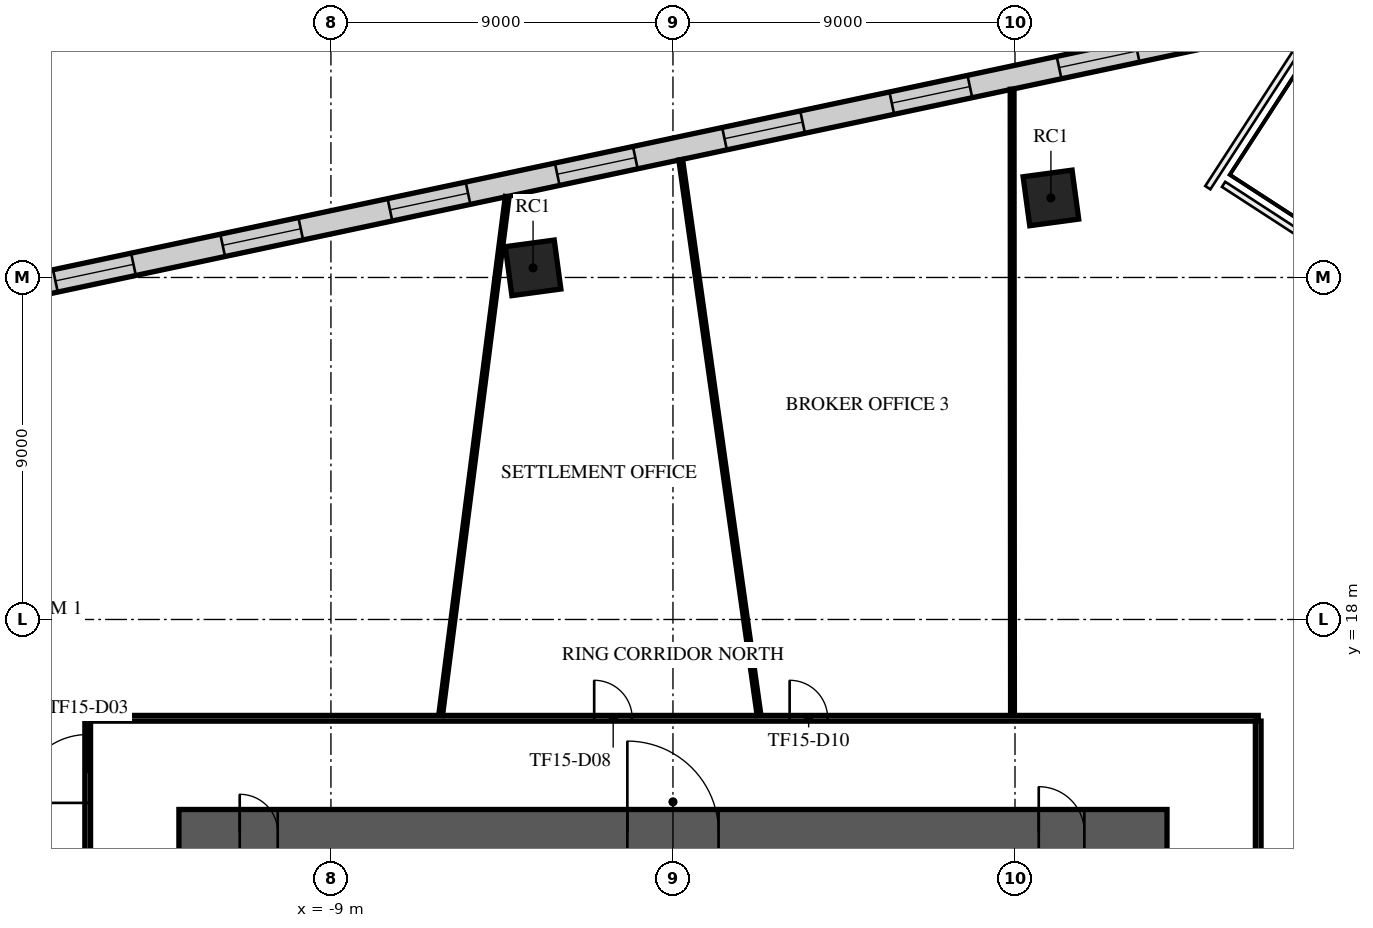
"""IFC4 building model, lengths in metres.
Left out: names, types, materials, properties, quantities, classifications, styles, units other than length and angle.
Written with IfcOpenShell. Run it as: python <this file> out.ifc"""

import sys

from ifc_helpers import new_model, si_unit, direction, frame, frame_2d, origin, origin_2d, place, context, subcontext, project, spatial, rectangle, extrude, element, fill, save


model = new_model("IFC4")
c1 = context("Model", 3, precision=1e-05, world=origin(), true_north=direction((0.0, 1.0)))
c2 = subcontext(c1, "Body", "Model", "MODEL_VIEW")
j1 = project(units=[si_unit("LENGTHUNIT", "METRE"), si_unit("PLANEANGLEUNIT", "RADIAN")], contexts=[c1])
p1 = place(None, origin())
s1 = spatial("IfcSite", under=j1, at=p1, CompositionType="ELEMENT")
p2 = place(p1, origin())
s2 = spatial("IfcBuilding", under=s1, at=p2, CompositionType="ELEMENT")
p3 = place(p2, frame((0.0, 0.0, 68.1)))
s3 = spatial("IfcBuildingStorey", under=s2, at=p3, CompositionType="ELEMENT", Elevation=68.1)
for number, where, z_axis, x_axis in (
    (1, (9.945, 29.093, 0.0), (0.0, 0.0, 1.0), (0.991, 0.134, 0.0)),
    (2, (-3.681, 27.253, 0.0), (0.0, 0.0, 1.0), (0.991, 0.134, 0.0)),
):
    element("IfcColumn", number, at=place(p3, frame(where, z_axis=z_axis, x_axis=x_axis)), inside=s3, PredefinedType="COLUMN", context=c2, shape_type="SweptSolid", body=[
        extrude(rectangle(XDim=1.3, YDim=1.3, at=origin_2d()), origin(), (0.0, 0.0, 1.0), 4.2),
    ])
p4 = place(p3, frame((-13.0, 12.4, 0.0), z_axis=(0.0, 0.0, 1.0), x_axis=(1.0, 0.0, 0.0)))
e3 = element("IfcWall", 3, at=p4, inside=s3, PredefinedType="SHEAR", context=c2, shape_type="SweptSolid", body=[
    extrude(rectangle(XDim=26.0, YDim=1.2, at=frame_2d((13.0, 0.0))), origin(), (0.0, 0.0, 1.0), 3.75),
])
p5 = place(p4, frame((11.8, 0.0, 0.0)))
e4 = element("IfcOpeningElement", 4, at=p5, cuts=e3, PredefinedType="OPENING", context=c2, shape_type="SweptSolid", body=[
    extrude(rectangle(XDim=2.4, YDim=2.4, at=frame_2d((1.2, 1.2))), frame((0.0, 0.61, 0.0), z_axis=(0.0, -1.0, 0.0), x_axis=(1.0, 0.0, 0.0)), (0.0, 0.0, 1.0), 1.22),
])
p6 = place(p4, frame((22.625, 0.0, 0.0)))
e5 = element("IfcOpeningElement", 5, at=p6, cuts=e3, PredefinedType="OPENING", context=c2, shape_type="SweptSolid", body=[
    extrude(rectangle(XDim=1.2, YDim=2.1, at=frame_2d((0.6, 1.05))), frame((0.0, 0.61, 0.0), z_axis=(0.0, -1.0, 0.0), x_axis=(1.0, 0.0, 0.0)), (0.0, 0.0, 1.0), 1.22),
])
p7 = place(p4, frame((1.6, 0.0, 0.0)))
e6 = element("IfcOpeningElement", 6, at=p7, cuts=e3, PredefinedType="OPENING", context=c2, shape_type="SweptSolid", body=[
    extrude(rectangle(XDim=1.0, YDim=2.1, at=frame_2d((0.5, 1.05))), frame((0.0, 0.61, 0.0), z_axis=(0.0, -1.0, 0.0), x_axis=(1.0, 0.0, 0.0)), (0.0, 0.0, 1.0), 1.22),
])
p8 = place(p3, frame((17.79, 34.145, 0.0), z_axis=(0.0, 0.0, 1.0), x_axis=(-0.978147175075, -0.207913693376, 0.0)))
e7 = element("IfcWall", 7, at=p8, inside=s3, PredefinedType="STANDARD", context=c2, shape_type="SweptSolid", body=[
    extrude(rectangle(XDim=49.376, YDim=0.6, at=frame_2d((24.688, 0.0))), origin(), (0.0, 0.0, 1.0), 3.75),
])
p9 = place(p8, frame((1.2, 0.0, 0.9)))
e8 = element("IfcOpeningElement", 8, at=p9, cuts=e7, PredefinedType="OPENING", context=c2, shape_type="SweptSolid", body=[
    extrude(rectangle(XDim=2.1, YDim=2.1, at=frame_2d((1.05, 1.05))), frame((0.0, 0.31, 0.0), z_axis=(0.0, -1.0, 0.0), x_axis=(1.0, 0.0, 0.0)), (0.0, 0.0, 1.0), 0.62),
])
p10 = place(p8, frame((5.7, 0.0, 0.9)))
e9 = element("IfcOpeningElement", 9, at=p10, cuts=e7, PredefinedType="OPENING", context=c2, shape_type="SweptSolid", body=[
    extrude(rectangle(XDim=2.1, YDim=2.1, at=frame_2d((1.05, 1.05))), frame((0.0, 0.31, 0.0), z_axis=(0.0, -1.0, 0.0), x_axis=(1.0, 0.0, 0.0)), (0.0, 0.0, 1.0), 0.62),
])
p11 = place(p8, frame((10.2, 0.0, 0.9)))
e10 = element("IfcOpeningElement", 10, at=p11, cuts=e7, PredefinedType="OPENING", context=c2, shape_type="SweptSolid", body=[
    extrude(rectangle(XDim=2.1, YDim=2.1, at=frame_2d((1.05, 1.05))), frame((0.0, 0.31, 0.0), z_axis=(0.0, -1.0, 0.0), x_axis=(1.0, 0.0, 0.0)), (0.0, 0.0, 1.0), 0.62),
])
p12 = place(p8, frame((14.7, 0.0, 0.9)))
e11 = element("IfcOpeningElement", 11, at=p12, cuts=e7, PredefinedType="OPENING", context=c2, shape_type="SweptSolid", body=[
    extrude(rectangle(XDim=2.1, YDim=2.1, at=frame_2d((1.05, 1.05))), frame((0.0, 0.31, 0.0), z_axis=(0.0, -1.0, 0.0), x_axis=(1.0, 0.0, 0.0)), (0.0, 0.0, 1.0), 0.62),
])
p13 = place(p8, frame((19.2, 0.0, 0.9)))
e12 = element("IfcOpeningElement", 12, at=p13, cuts=e7, PredefinedType="OPENING", context=c2, shape_type="SweptSolid", body=[
    extrude(rectangle(XDim=2.1, YDim=2.1, at=frame_2d((1.05, 1.05))), frame((0.0, 0.31, 0.0), z_axis=(0.0, -1.0, 0.0), x_axis=(1.0, 0.0, 0.0)), (0.0, 0.0, 1.0), 0.62),
])
p14 = place(p8, frame((23.7, 0.0, 0.9)))
e13 = element("IfcOpeningElement", 13, at=p14, cuts=e7, PredefinedType="OPENING", context=c2, shape_type="SweptSolid", body=[
    extrude(rectangle(XDim=2.1, YDim=2.1, at=frame_2d((1.05, 1.05))), frame((0.0, 0.31, 0.0), z_axis=(0.0, -1.0, 0.0), x_axis=(1.0, 0.0, 0.0)), (0.0, 0.0, 1.0), 0.62),
])
p15 = place(p8, frame((28.2, 0.0, 0.9)))
e14 = element("IfcOpeningElement", 14, at=p15, cuts=e7, PredefinedType="OPENING", context=c2, shape_type="SweptSolid", body=[
    extrude(rectangle(XDim=2.1, YDim=2.1, at=frame_2d((1.05, 1.05))), frame((0.0, 0.31, 0.0), z_axis=(0.0, -1.0, 0.0), x_axis=(1.0, 0.0, 0.0)), (0.0, 0.0, 1.0), 0.62),
])
p16 = place(p8, frame((32.7, 0.0, 0.9)))
e15 = element("IfcOpeningElement", 15, at=p16, cuts=e7, PredefinedType="OPENING", context=c2, shape_type="SweptSolid", body=[
    extrude(rectangle(XDim=2.1, YDim=2.1, at=frame_2d((1.05, 1.05))), frame((0.0, 0.31, 0.0), z_axis=(0.0, -1.0, 0.0), x_axis=(1.0, 0.0, 0.0)), (0.0, 0.0, 1.0), 0.62),
])
p17 = place(p8, frame((37.2, 0.0, 0.9)))
e16 = element("IfcOpeningElement", 16, at=p17, cuts=e7, PredefinedType="OPENING", context=c2, shape_type="SweptSolid", body=[
    extrude(rectangle(XDim=2.1, YDim=2.1, at=frame_2d((1.05, 1.05))), frame((0.0, 0.31, 0.0), z_axis=(0.0, -1.0, 0.0), x_axis=(1.0, 0.0, 0.0)), (0.0, 0.0, 1.0), 0.62),
])
p18 = place(p8, frame((41.7, 0.0, 0.9)))
e17 = element("IfcOpeningElement", 17, at=p18, cuts=e7, PredefinedType="OPENING", context=c2, shape_type="SweptSolid", body=[
    extrude(rectangle(XDim=2.1, YDim=2.1, at=frame_2d((1.05, 1.05))), frame((0.0, 0.31, 0.0), z_axis=(0.0, -1.0, 0.0), x_axis=(1.0, 0.0, 0.0)), (0.0, 0.0, 1.0), 0.62),
])
p19 = place(p8, frame((46.138, 0.0, 0.9)))
e18 = element("IfcOpeningElement", 18, at=p19, cuts=e7, PredefinedType="OPENING", context=c2, shape_type="SweptSolid", body=[
    extrude(rectangle(XDim=2.1, YDim=2.1, at=frame_2d((1.05, 1.05))), frame((0.0, 0.31, 0.0), z_axis=(0.0, -1.0, 0.0), x_axis=(1.0, 0.0, 0.0)), (0.0, 0.0, 1.0), 0.62),
])
p20 = place(p3, frame((-15.4, -15.4, 0.0), z_axis=(0.0, 0.0, 1.0), x_axis=(0.0, 1.0, 0.0)))
e19 = element("IfcWall", 19, at=p20, inside=s3, PredefinedType="PARTITIONING", context=c2, shape_type="SweptSolid", body=[
    extrude(rectangle(XDim=30.8, YDim=0.15, at=frame_2d((15.4, 0.0))), origin(), (0.0, 0.0, 1.0), 3.25),
])
p21 = place(p20, frame((14.771, 0.0, 0.0)))
e20 = element("IfcOpeningElement", 20, at=p21, cuts=e19, PredefinedType="OPENING", context=c2, shape_type="SweptSolid", body=[
    extrude(rectangle(XDim=1.0, YDim=2.1, at=frame_2d((0.5, 1.05))), frame((0.0, 0.085, 0.0), z_axis=(0.0, -1.0, 0.0), x_axis=(1.0, 0.0, 0.0)), (0.0, 0.0, 1.0), 0.17),
])
p22 = place(p20, frame((11.897, 0.0, 0.0)))
e21 = element("IfcOpeningElement", 21, at=p22, cuts=e19, PredefinedType="OPENING", context=c2, shape_type="SweptSolid", body=[
    extrude(rectangle(XDim=1.0, YDim=2.1, at=frame_2d((0.5, 1.05))), frame((0.0, 0.085, 0.0), z_axis=(0.0, -1.0, 0.0), x_axis=(1.0, 0.0, 0.0)), (0.0, 0.0, 1.0), 0.17),
])
p23 = place(p20, frame((28.573, 0.0, 0.0)))
e22 = element("IfcOpeningElement", 22, at=p23, cuts=e19, PredefinedType="OPENING", context=c2, shape_type="SweptSolid", body=[
    extrude(rectangle(XDim=1.8, YDim=2.1, at=frame_2d((0.9, 1.05))), frame((0.0, 0.085, 0.0), z_axis=(0.0, -1.0, 0.0), x_axis=(1.0, 0.0, 0.0)), (0.0, 0.0, 1.0), 0.17),
])
p24 = place(p20, frame((24.323, 0.0, 0.0)))
e23 = element("IfcOpeningElement", 23, at=p24, cuts=e19, PredefinedType="OPENING", context=c2, shape_type="SweptSolid", body=[
    extrude(rectangle(XDim=1.0, YDim=2.1, at=frame_2d((0.5, 1.05))), frame((0.0, 0.085, 0.0), z_axis=(0.0, -1.0, 0.0), x_axis=(1.0, 0.0, 0.0)), (0.0, 0.0, 1.0), 0.17),
])
p25 = place(p20, frame((1.05, 0.0, 0.0)))
e24 = element("IfcOpeningElement", 24, at=p25, cuts=e19, PredefinedType="OPENING", context=c2, shape_type="SweptSolid", body=[
    extrude(rectangle(XDim=1.0, YDim=2.1, at=frame_2d((0.5, 1.05))), frame((0.0, 0.085, 0.0), z_axis=(0.0, -1.0, 0.0), x_axis=(1.0, 0.0, 0.0)), (0.0, 0.0, 1.0), 0.17),
])
p26 = place(p3, frame((-15.325, 15.4, 0.0), z_axis=(0.0, 0.0, 1.0), x_axis=(1.0, 0.0, 0.0)))
e25 = element("IfcWall", 25, at=p26, inside=s3, PredefinedType="PARTITIONING", context=c2, shape_type="SweptSolid", body=[
    extrude(rectangle(XDim=30.725, YDim=0.15, at=frame_2d((15.362, 0.0))), origin(), (0.0, 0.0, 1.0), 3.25),
])
p27 = place(p26, frame((13.252, 0.0, 0.0)))
e26 = element("IfcOpeningElement", 26, at=p27, cuts=e25, PredefinedType="OPENING", context=c2, shape_type="SweptSolid", body=[
    extrude(rectangle(XDim=1.0, YDim=2.1, at=frame_2d((0.5, 1.05))), frame((0.0, 0.085, 0.0), z_axis=(0.0, -1.0, 0.0), x_axis=(1.0, 0.0, 0.0)), (0.0, 0.0, 1.0), 0.17),
])
p28 = place(p26, frame((18.395, 0.0, 0.0)))
e27 = element("IfcOpeningElement", 27, at=p28, cuts=e25, PredefinedType="OPENING", context=c2, shape_type="SweptSolid", body=[
    extrude(rectangle(XDim=1.0, YDim=2.1, at=frame_2d((0.5, 1.05))), frame((0.0, 0.085, 0.0), z_axis=(0.0, -1.0, 0.0), x_axis=(1.0, 0.0, 0.0)), (0.0, 0.0, 1.0), 0.17),
])
p29 = place(p3, frame((15.4, -15.325, 0.0), z_axis=(0.0, 0.0, 1.0), x_axis=(0.0, 1.0, 0.0)))
e28 = element("IfcWall", 28, at=p29, inside=s3, PredefinedType="PARTITIONING", context=c2, shape_type="SweptSolid", body=[
    extrude(rectangle(XDim=30.65, YDim=0.15, at=frame_2d((15.325, 0.0))), origin(), (0.0, 0.0, 1.0), 3.25),
])
p30 = place(p29, frame((16.405, 0.0, 0.0)))
e29 = element("IfcOpeningElement", 29, at=p30, cuts=e28, PredefinedType="OPENING", context=c2, shape_type="SweptSolid", body=[
    extrude(rectangle(XDim=1.8, YDim=2.1, at=frame_2d((0.9, 1.05))), frame((0.0, 0.085, 0.0), z_axis=(0.0, -1.0, 0.0), x_axis=(1.0, 0.0, 0.0)), (0.0, 0.0, 1.0), 0.17),
])
p31 = place(p29, frame((23.905, 0.0, 0.0)))
e30 = element("IfcOpeningElement", 30, at=p31, cuts=e28, PredefinedType="OPENING", context=c2, shape_type="SweptSolid", body=[
    extrude(rectangle(XDim=1.0, YDim=2.1, at=frame_2d((0.5, 1.05))), frame((0.0, 0.085, 0.0), z_axis=(0.0, -1.0, 0.0), x_axis=(1.0, 0.0, 0.0)), (0.0, 0.0, 1.0), 0.17),
])
p32 = place(p29, frame((2.8, 0.0, 0.0)))
e31 = element("IfcOpeningElement", 31, at=p32, cuts=e28, PredefinedType="OPENING", context=c2, shape_type="SweptSolid", body=[
    extrude(rectangle(XDim=1.0, YDim=2.1, at=frame_2d((0.5, 1.05))), frame((0.0, 0.085, 0.0), z_axis=(0.0, -1.0, 0.0), x_axis=(1.0, 0.0, 0.0)), (0.0, 0.0, 1.0), 0.17),
])
p33 = place(p29, frame((5.455, 0.0, 0.0)))
e32 = element("IfcOpeningElement", 32, at=p33, cuts=e28, PredefinedType="OPENING", context=c2, shape_type="SweptSolid", body=[
    extrude(rectangle(XDim=1.8, YDim=2.1, at=frame_2d((0.9, 1.05))), frame((0.0, 0.085, 0.0), z_axis=(0.0, -1.0, 0.0), x_axis=(1.0, 0.0, 0.0)), (0.0, 0.0, 1.0), 0.17),
])
p34 = place(p29, frame((12.955, 0.0, 0.0)))
e33 = element("IfcOpeningElement", 33, at=p34, cuts=e28, PredefinedType="OPENING", context=c2, shape_type="SweptSolid", body=[
    extrude(rectangle(XDim=1.0, YDim=2.1, at=frame_2d((0.5, 1.05))), frame((0.0, 0.085, 0.0), z_axis=(0.0, -1.0, 0.0), x_axis=(1.0, 0.0, 0.0)), (0.0, 0.0, 1.0), 0.17),
])
p35 = place(p3, frame((-6.113, 15.481, 0.0), z_axis=(0.0, 0.0, 1.0), x_axis=(0.127303532476, 0.991863806487, 0.0)))
e34 = element("IfcWall", 34, at=p35, inside=s3, PredefinedType="PARTITIONING", context=c2, shape_type="SweptSolid", body=[
    extrude(rectangle(XDim=13.758, YDim=0.1, at=frame_2d((6.879, 0.0))), origin(), (0.0, 0.0, 1.0), 2.95),
])
p36 = place(p3, frame((0.204, 30.098, 0.0), z_axis=(0.0, 0.0, 1.0), x_axis=(0.139564003069, -0.990213052352, 0.0)))
e35 = element("IfcWall", 35, at=p36, inside=s3, PredefinedType="PARTITIONING", context=c2, shape_type="SweptSolid", body=[
    extrude(rectangle(XDim=14.761, YDim=0.1, at=frame_2d((7.38, 0.0))), origin(), (0.0, 0.0, 1.0), 2.95),
])
p37 = place(p3, frame((8.924, 31.952, 0.0), z_axis=(0.0, 0.0, 1.0), x_axis=(0.000592697857, -0.999999824355, 0.0)))
e36 = element("IfcWall", 36, at=p37, inside=s3, PredefinedType="PARTITIONING", context=c2, shape_type="SweptSolid", body=[
    extrude(rectangle(XDim=16.477, YDim=0.1, at=frame_2d((8.238, 0.0))), origin(), (0.0, 0.0, 1.0), 2.95),
])
p38 = place(p5, origin())
e37 = element("IfcDoor", 37, at=p38, inside=s3, OperationType="SINGLE_SWING_LEFT", PredefinedType="DOOR", context=c2, shape_type="SweptSolid", body=[
    extrude(rectangle(XDim=2.4, YDim=2.4, at=frame_2d((1.2, 1.2))), frame((0.0, 0.025, 0.0), z_axis=(0.0, -1.0, 0.0), x_axis=(1.0, 0.0, 0.0)), (0.0, 0.0, 1.0), 0.05),
])
fill(e4, e37)
p39 = place(p6, origin())
e38 = element("IfcDoor", 38, at=p39, inside=s3, OperationType="SINGLE_SWING_LEFT", PredefinedType="DOOR", context=c2, shape_type="SweptSolid", body=[
    extrude(rectangle(XDim=1.2, YDim=2.1, at=frame_2d((0.6, 1.05))), frame((0.0, 0.025, 0.0), z_axis=(0.0, -1.0, 0.0), x_axis=(1.0, 0.0, 0.0)), (0.0, 0.0, 1.0), 0.05),
])
fill(e5, e38)
p40 = place(p7, origin())
e39 = element("IfcDoor", 39, at=p40, inside=s3, OperationType="SINGLE_SWING_LEFT", PredefinedType="DOOR", context=c2, shape_type="SweptSolid", body=[
    extrude(rectangle(XDim=1.0, YDim=2.1, at=frame_2d((0.5, 1.05))), frame((0.0, 0.025, 0.0), z_axis=(0.0, -1.0, 0.0), x_axis=(1.0, 0.0, 0.0)), (0.0, 0.0, 1.0), 0.05),
])
fill(e6, e39)
p41 = place(p10, origin())
e40 = element("IfcWindow", 40, at=p41, inside=s3, PartitioningType="SINGLE_PANEL", PredefinedType="WINDOW", context=c2, shape_type="SweptSolid", body=[
    extrude(rectangle(XDim=2.1, YDim=2.1, at=frame_2d((1.05, 1.05))), frame((0.0, 0.03, 0.0), z_axis=(0.0, -1.0, 0.0), x_axis=(1.0, 0.0, 0.0)), (0.0, 0.0, 1.0), 0.06),
])
fill(e9, e40)
p42 = place(p11, origin())
e41 = element("IfcWindow", 41, at=p42, inside=s3, PartitioningType="SINGLE_PANEL", PredefinedType="WINDOW", context=c2, shape_type="SweptSolid", body=[
    extrude(rectangle(XDim=2.1, YDim=2.1, at=frame_2d((1.05, 1.05))), frame((0.0, 0.03, 0.0), z_axis=(0.0, -1.0, 0.0), x_axis=(1.0, 0.0, 0.0)), (0.0, 0.0, 1.0), 0.06),
])
fill(e10, e41)
p43 = place(p12, origin())
e42 = element("IfcWindow", 42, at=p43, inside=s3, PartitioningType="SINGLE_PANEL", PredefinedType="WINDOW", context=c2, shape_type="SweptSolid", body=[
    extrude(rectangle(XDim=2.1, YDim=2.1, at=frame_2d((1.05, 1.05))), frame((0.0, 0.03, 0.0), z_axis=(0.0, -1.0, 0.0), x_axis=(1.0, 0.0, 0.0)), (0.0, 0.0, 1.0), 0.06),
])
fill(e11, e42)
p44 = place(p13, origin())
e43 = element("IfcWindow", 43, at=p44, inside=s3, PartitioningType="SINGLE_PANEL", PredefinedType="WINDOW", context=c2, shape_type="SweptSolid", body=[
    extrude(rectangle(XDim=2.1, YDim=2.1, at=frame_2d((1.05, 1.05))), frame((0.0, 0.03, 0.0), z_axis=(0.0, -1.0, 0.0), x_axis=(1.0, 0.0, 0.0)), (0.0, 0.0, 1.0), 0.06),
])
fill(e12, e43)
p45 = place(p14, origin())
e44 = element("IfcWindow", 44, at=p45, inside=s3, PartitioningType="SINGLE_PANEL", PredefinedType="WINDOW", context=c2, shape_type="SweptSolid", body=[
    extrude(rectangle(XDim=2.1, YDim=2.1, at=frame_2d((1.05, 1.05))), frame((0.0, 0.03, 0.0), z_axis=(0.0, -1.0, 0.0), x_axis=(1.0, 0.0, 0.0)), (0.0, 0.0, 1.0), 0.06),
])
fill(e13, e44)
p46 = place(p15, origin())
e45 = element("IfcWindow", 45, at=p46, inside=s3, PartitioningType="SINGLE_PANEL", PredefinedType="WINDOW", context=c2, shape_type="SweptSolid", body=[
    extrude(rectangle(XDim=2.1, YDim=2.1, at=frame_2d((1.05, 1.05))), frame((0.0, 0.03, 0.0), z_axis=(0.0, -1.0, 0.0), x_axis=(1.0, 0.0, 0.0)), (0.0, 0.0, 1.0), 0.06),
])
fill(e14, e45)
p47 = place(p16, origin())
e46 = element("IfcWindow", 46, at=p47, inside=s3, PartitioningType="SINGLE_PANEL", PredefinedType="WINDOW", context=c2, shape_type="SweptSolid", body=[
    extrude(rectangle(XDim=2.1, YDim=2.1, at=frame_2d((1.05, 1.05))), frame((0.0, 0.03, 0.0), z_axis=(0.0, -1.0, 0.0), x_axis=(1.0, 0.0, 0.0)), (0.0, 0.0, 1.0), 0.06),
])
fill(e15, e46)
p48 = place(p23, origin())
e47 = element("IfcDoor", 47, at=p48, inside=s3, OperationType="DOUBLE_DOOR_SINGLE_SWING", PredefinedType="DOOR", context=c2, shape_type="SweptSolid", body=[
    extrude(rectangle(XDim=1.8, YDim=2.1, at=frame_2d((0.9, 1.05))), frame((0.0, 0.025, 0.0), z_axis=(0.0, -1.0, 0.0), x_axis=(1.0, 0.0, 0.0)), (0.0, 0.0, 1.0), 0.05),
])
fill(e22, e47)
p49 = place(p27, origin())
e48 = element("IfcDoor", 48, at=p49, inside=s3, OperationType="SINGLE_SWING_RIGHT", PredefinedType="DOOR", context=c2, shape_type="SweptSolid", body=[
    extrude(rectangle(XDim=1.0, YDim=2.1, at=frame_2d((0.5, 1.05))), frame((0.0, 0.025, 0.0), z_axis=(0.0, -1.0, 0.0), x_axis=(1.0, 0.0, 0.0)), (0.0, 0.0, 1.0), 0.05),
])
fill(e26, e48)
p50 = place(p28, origin())
e49 = element("IfcDoor", 49, at=p50, inside=s3, OperationType="SINGLE_SWING_LEFT", PredefinedType="DOOR", context=c2, shape_type="SweptSolid", body=[
    extrude(rectangle(XDim=1.0, YDim=2.1, at=frame_2d((0.5, 1.05))), frame((0.0, 0.025, 0.0), z_axis=(0.0, -1.0, 0.0), x_axis=(1.0, 0.0, 0.0)), (0.0, 0.0, 1.0), 0.05),
])
fill(e27, e49)
save(model, sys.argv[1])
